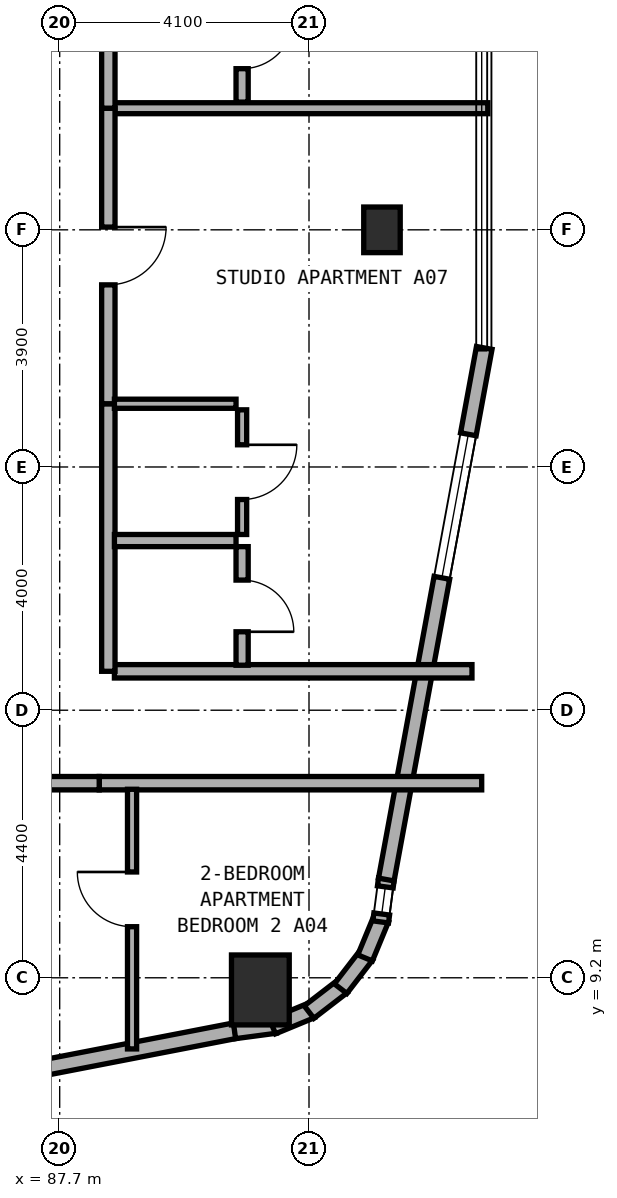
"""IFC4 building model, lengths in metres.
Left out: names, types, materials, properties, quantities, classifications, styles, units other than length and angle.
Written with IfcOpenShell. Run it as: python <this file> out.ifc"""

import sys

from ifc_helpers import new_model, si_unit, direction, frame, frame_2d, origin, origin_2d, place, context, subcontext, project, spatial, rectangle, extrude, element, fill, save


model = new_model("IFC4")
c1 = context("Model", 3, precision=1e-05, world=origin(), true_north=direction((0.0, 1.0)))
c2 = subcontext(c1, "Body", "Model", "MODEL_VIEW")
j1 = project(units=[si_unit("LENGTHUNIT", "METRE"), si_unit("PLANEANGLEUNIT", "RADIAN")], contexts=[c1])
p1 = place(None, origin())
s1 = spatial("IfcSite", under=j1, at=p1, CompositionType="ELEMENT")
p2 = place(p1, origin())
s2 = spatial("IfcBuilding", under=s1, at=p2, CompositionType="ELEMENT")
p3 = place(p2, frame((0.0, 0.0, 95.0)))
s3 = spatial("IfcBuildingStorey", under=s2, at=p3, CompositionType="ELEMENT", Elevation=95.0)
p4 = place(p3, frame((93.0, 21.5, 0.0), z_axis=(0.0, 0.0, 1.0), x_axis=(1.0, 0.0, 0.0)))
e1 = element("IfcColumn", 1, at=p4, inside=s3, PredefinedType="COLUMN", context=c2, shape_type="SweptSolid", body=[
    extrude(rectangle(XDim=0.6, YDim=0.75, at=origin_2d()), origin(), (0.0, 0.0, 1.0), 3.5),
])
p5 = place(p3, frame((91.0, 9.0, 0.0), z_axis=(0.0, 0.0, 1.0), x_axis=(1.0, 0.0, 0.0)))
e2 = element("IfcColumn", 2, at=p5, inside=s3, PredefinedType="COLUMN", context=c2, shape_type="SweptSolid", body=[
    extrude(rectangle(XDim=0.95, YDim=1.15, at=origin_2d()), origin(), (0.0, 0.0, 1.0), 3.5),
])
p6 = place(p3, frame((82.261, 6.718, 0.0), z_axis=(0.0, 0.0, 1.0), x_axis=(0.981750199588, 0.190175039396, 0.0)))
e3 = element("IfcWall", 3, at=p6, inside=s3, PredefinedType="STANDARD", context=c2, shape_type="SweptSolid", body=[
    extrude(rectangle(XDim=8.477, YDim=0.26, at=frame_2d((4.238, 0.0))), origin(), (0.0, 0.0, 1.0), 3.25),
])
p7 = place(p6, frame((2.139, 0.0, 0.8)))
e4 = element("IfcOpeningElement", 4, at=p7, cuts=e3, PredefinedType="OPENING", context=c2, shape_type="SweptSolid", body=[
    extrude(rectangle(XDim=2.4, YDim=1.6, at=frame_2d((1.2, 0.8))), frame((0.0, 0.14, 0.0), z_axis=(0.0, -1.0, 0.0), x_axis=(1.0, 0.0, 0.0)), (0.0, 0.0, 1.0), 0.28),
])
p8 = place(p3, frame((90.575, 8.328, 0.0), z_axis=(0.0, 0.0, 1.0), x_axis=(0.991300187529, 0.13162043232, 0.0)))
e5 = element("IfcWall", 5, at=p8, inside=s3, PredefinedType="STANDARD", context=c2, shape_type="SweptSolid", body=[
    extrude(rectangle(XDim=0.677, YDim=0.26, at=frame_2d((0.338, 0.0))), origin(), (0.0, 0.0, 1.0), 3.25),
])
for number, where, z_axis, x_axis in (
    (6, (91.2, 8.399, 0.0), (0.0, 0.0, 1.0), (0.924, 0.382, 0.0)),
    (7, (91.801, 8.636, 0.0), (0.0, 0.0, 1.0), (0.793, 0.61, 0.0)),
    (8, (92.32, 9.021, 0.0), (0.0, 0.0, 1.0), (0.609, 0.793, 0.0)),
):
    element("IfcWall", number, at=place(p3, frame(where, z_axis=z_axis, x_axis=x_axis)), inside=s3, PredefinedType="STANDARD", context=c2, shape_type="SweptSolid", body=[
        extrude(rectangle(XDim=0.694, YDim=0.26, at=frame_2d((0.347, 0.0))), origin(), (0.0, 0.0, 1.0), 3.25),
    ])
p9 = place(p3, frame((92.722, 9.527, 0.0), z_axis=(0.0, 0.0, 1.0), x_axis=(0.382289608286, 0.924042561464, 0.0)))
e9 = element("IfcWall", 9, at=p9, inside=s3, PredefinedType="STANDARD", context=c2, shape_type="SweptSolid", body=[
    extrude(rectangle(XDim=0.694, YDim=0.26, at=frame_2d((0.347, 0.0))), origin(), (0.0, 0.0, 1.0), 3.25),
])
p10 = place(p3, frame((92.979, 10.119, 0.0), z_axis=(0.0, 0.0, 1.0), x_axis=(0.130614135366, 0.991433279471, 0.0)))
e10 = element("IfcWall", 10, at=p10, inside=s3, PredefinedType="STANDARD", context=c2, shape_type="SweptSolid", body=[
    extrude(rectangle(XDim=0.712, YDim=0.26, at=frame_2d((0.356, 0.0))), origin(), (0.0, 0.0, 1.0), 3.25),
])
p11 = place(p10, frame((0.131, 0.0, 0.85)))
e11 = element("IfcOpeningElement", 11, at=p11, cuts=e10, PredefinedType="OPENING", context=c2, shape_type="SweptSolid", body=[
    extrude(rectangle(XDim=0.45, YDim=1.5, at=frame_2d((0.225, 0.75))), frame((0.0, 0.14, 0.0), z_axis=(0.0, -1.0, 0.0), x_axis=(1.0, 0.0, 0.0)), (0.0, 0.0, 1.0), 0.28),
])
p12 = place(p3, frame((93.071, 10.816, 0.0), z_axis=(0.0, 0.0, 1.0), x_axis=(0.181209963057, 0.983444431215, 0.0)))
e12 = element("IfcWall", 12, at=p12, inside=s3, PredefinedType="STANDARD", context=c2, shape_type="SweptSolid", body=[
    extrude(rectangle(XDim=8.889, YDim=0.26, at=frame_2d((4.445, 0.0))), origin(), (0.0, 0.0, 1.0), 3.25),
])
p13 = place(p12, frame((5.045, 0.0, 0.8)))
e13 = element("IfcOpeningElement", 13, at=p13, cuts=e12, PredefinedType="OPENING", context=c2, shape_type="SweptSolid", body=[
    extrude(rectangle(XDim=2.4, YDim=1.6, at=frame_2d((1.2, 0.8))), frame((0.0, 0.14, 0.0), z_axis=(0.0, -1.0, 0.0), x_axis=(1.0, 0.0, 0.0)), (0.0, 0.0, 1.0), 0.28),
])
p14 = place(p3, frame((88.35, 12.4, 0.0), z_axis=(0.0, 0.0, 1.0), x_axis=(1.0, 0.0, 0.0)))
e14 = element("IfcWall", 14, at=p14, inside=s3, PredefinedType="SOLIDWALL", context=c2, shape_type="SweptSolid", body=[
    extrude(rectangle(XDim=6.29, YDim=0.22, at=frame_2d((3.145, 0.0))), origin(), (0.0, 0.0, 1.0), 2.945),
])
p15 = place(p3, frame((79.28, 12.4, 0.0), z_axis=(0.0, 0.0, 1.0), x_axis=(1.0, 0.0, 0.0)))
e15 = element("IfcWall", 15, at=p15, inside=s3, PredefinedType="SOLIDWALL", context=c2, shape_type="SweptSolid", body=[
    extrude(rectangle(XDim=9.07, YDim=0.22, at=frame_2d((4.535, 0.0))), origin(), (0.0, 0.0, 1.0), 2.825),
])
p16 = place(p15, frame((4.06, 0.0, 0.0)))
e16 = element("IfcOpeningElement", 16, at=p16, cuts=e15, PredefinedType="OPENING", context=c2, shape_type="SweptSolid", body=[
    extrude(rectangle(XDim=0.95, YDim=2.1, at=frame_2d((0.475, 1.05))), frame((0.0, 0.12, 0.0), z_axis=(0.0, -1.0, 0.0), x_axis=(1.0, 0.0, 0.0)), (0.0, 0.0, 1.0), 0.24),
])
p17 = place(p3, frame((88.89, 8.03, 0.0), z_axis=(0.0, 0.0, 1.0), x_axis=(0.0, 1.0, 0.0)))
e17 = element("IfcWall", 17, at=p17, inside=s3, PredefinedType="PARTITIONING", context=c2, shape_type="SweptSolid", body=[
    extrude(rectangle(XDim=4.27, YDim=0.15, at=frame_2d((2.135, 0.0))), origin(), (0.0, 0.0, 1.0), 2.945),
])
p18 = place(p17, frame((2.01, 0.0, 0.0)))
e18 = element("IfcOpeningElement", 18, at=p18, cuts=e17, PredefinedType="OPENING", context=c2, shape_type="SweptSolid", body=[
    extrude(rectangle(XDim=0.9, YDim=2.1, at=frame_2d((0.45, 1.05))), frame((0.0, 0.085, 0.0), z_axis=(0.0, -1.0, 0.0), x_axis=(1.0, 0.0, 0.0)), (0.0, 0.0, 1.0), 0.17),
])
p19 = place(p3, frame((88.6, 14.24, 0.0), z_axis=(0.0, 0.0, 1.0), x_axis=(1.0, 0.0, 0.0)))
e19 = element("IfcWall", 19, at=p19, inside=s3, PredefinedType="SOLIDWALL", context=c2, shape_type="SweptSolid", body=[
    extrude(rectangle(XDim=5.88, YDim=0.22, at=frame_2d((2.94, 0.0))), origin(), (0.0, 0.0, 1.0), 2.945),
])
p20 = place(p3, frame((88.5, 23.5, 0.0), z_axis=(0.0, 0.0, 1.0), x_axis=(1.0, 0.0, 0.0)))
e20 = element("IfcWall", 20, at=p20, inside=s3, PredefinedType="SOLIDWALL", context=c2, shape_type="SweptSolid", body=[
    extrude(rectangle(XDim=6.24, YDim=0.18, at=frame_2d((3.12, 0.0))), origin(), (0.0, 0.0, 1.0), 2.945),
])
p21 = place(p3, frame((88.5, 14.24, 0.0), z_axis=(0.0, 0.0, 1.0), x_axis=(0.0, 1.0, 0.0)))
e21 = element("IfcWall", 21, at=p21, inside=s3, PredefinedType="SOLIDWALL", context=c2, shape_type="SweptSolid", body=[
    extrude(rectangle(XDim=4.4, YDim=0.22, at=frame_2d((2.2, 0.0))), origin(), (0.0, 0.0, 1.0), 3.22),
])
p22 = place(p3, frame((88.5, 18.64, 0.0), z_axis=(0.0, 0.0, 1.0), x_axis=(0.0, 1.0, 0.0)))
e22 = element("IfcWall", 22, at=p22, inside=s3, PredefinedType="SOLIDWALL", context=c2, shape_type="SweptSolid", body=[
    extrude(rectangle(XDim=4.86, YDim=0.22, at=frame_2d((2.43, 0.0))), origin(), (0.0, 0.0, 1.0), 2.825),
])
p23 = place(p22, frame((1.955, 0.0, 0.0)))
e23 = element("IfcOpeningElement", 23, at=p23, cuts=e22, PredefinedType="OPENING", context=c2, shape_type="SweptSolid", body=[
    extrude(rectangle(XDim=0.95, YDim=2.1, at=frame_2d((0.475, 1.05))), frame((0.0, 0.12, 0.0), z_axis=(0.0, -1.0, 0.0), x_axis=(1.0, 0.0, 0.0)), (0.0, 0.0, 1.0), 0.24),
])
p24 = place(p3, frame((88.6, 16.39, 0.0), z_axis=(0.0, 0.0, 1.0), x_axis=(1.0, 0.0, 0.0)))
e24 = element("IfcWall", 24, at=p24, inside=s3, PredefinedType="PLUMBINGWALL", context=c2, shape_type="SweptSolid", body=[
    extrude(rectangle(XDim=2.0, YDim=0.2, at=frame_2d((1.0, 0.0))), origin(), (0.0, 0.0, 1.0), 3.22),
])
p25 = place(p3, frame((88.6, 18.64, 0.0), z_axis=(0.0, 0.0, 1.0), x_axis=(1.0, 0.0, 0.0)))
e25 = element("IfcWall", 25, at=p25, inside=s3, PredefinedType="PARTITIONING", context=c2, shape_type="SweptSolid", body=[
    extrude(rectangle(XDim=2.0, YDim=0.15, at=frame_2d((1.0, 0.0))), origin(), (0.0, 0.0, 1.0), 3.22),
])
p26 = place(p3, frame((90.7, 14.34, 0.0), z_axis=(0.0, 0.0, 1.0), x_axis=(0.0, 1.0, 0.0)))
e26 = element("IfcWall", 26, at=p26, inside=s3, PredefinedType="PLUMBINGWALL", context=c2, shape_type="SweptSolid", body=[
    extrude(rectangle(XDim=1.95, YDim=0.2, at=frame_2d((0.975, 0.0))), origin(), (0.0, 0.0, 1.0), 3.22),
])
p27 = place(p26, frame((0.55, 0.0, 0.0)))
e27 = element("IfcOpeningElement", 27, at=p27, cuts=e26, PredefinedType="OPENING", context=c2, shape_type="SweptSolid", body=[
    extrude(rectangle(XDim=0.85, YDim=2.1, at=frame_2d((0.425, 1.05))), frame((0.0, 0.11, 0.0), z_axis=(0.0, -1.0, 0.0), x_axis=(1.0, 0.0, 0.0)), (0.0, 0.0, 1.0), 0.22),
])
p28 = place(p3, frame((90.7, 16.49, 0.0), z_axis=(0.0, 0.0, 1.0), x_axis=(0.0, 1.0, 0.0)))
e28 = element("IfcWall", 28, at=p28, inside=s3, PredefinedType="PARTITIONING", context=c2, shape_type="SweptSolid", body=[
    extrude(rectangle(XDim=2.05, YDim=0.15, at=frame_2d((1.025, 0.0))), origin(), (0.0, 0.0, 1.0), 3.22),
])
p29 = place(p28, frame((0.575, 0.0, 0.0)))
e29 = element("IfcOpeningElement", 29, at=p29, cuts=e28, PredefinedType="OPENING", context=c2, shape_type="SweptSolid", body=[
    extrude(rectangle(XDim=0.9, YDim=2.1, at=frame_2d((0.45, 1.05))), frame((0.0, 0.085, 0.0), z_axis=(0.0, -1.0, 0.0), x_axis=(1.0, 0.0, 0.0)), (0.0, 0.0, 1.0), 0.17),
])
p30 = place(p3, frame((88.5, 23.5, 0.0), z_axis=(0.0, 0.0, 1.0), x_axis=(0.0, 1.0, 0.0)))
e30 = element("IfcWall", 30, at=p30, inside=s3, PredefinedType="SOLIDWALL", context=c2, shape_type="SweptSolid", body=[
    extrude(rectangle(XDim=4.4, YDim=0.22, at=frame_2d((2.2, 0.0))), origin(), (0.0, 0.0, 1.0), 3.22),
])
p31 = place(p3, frame((90.7, 23.6, 0.0), z_axis=(0.0, 0.0, 1.0), x_axis=(0.0, 1.0, 0.0)))
e31 = element("IfcWall", 31, at=p31, inside=s3, PredefinedType="PLUMBINGWALL", context=c2, shape_type="SweptSolid", body=[
    extrude(rectangle(XDim=1.95, YDim=0.2, at=frame_2d((0.975, 0.0))), origin(), (0.0, 0.0, 1.0), 3.22),
])
p32 = place(p31, frame((0.55, 0.0, 0.0)))
e32 = element("IfcOpeningElement", 32, at=p32, cuts=e31, PredefinedType="OPENING", context=c2, shape_type="SweptSolid", body=[
    extrude(rectangle(XDim=0.85, YDim=2.1, at=frame_2d((0.425, 1.05))), frame((0.0, 0.11, 0.0), z_axis=(0.0, -1.0, 0.0), x_axis=(1.0, 0.0, 0.0)), (0.0, 0.0, 1.0), 0.22),
])
p33 = place(p13, origin())
e33 = element("IfcWindow", 33, at=p33, inside=s3, PartitioningType="SINGLE_PANEL", PredefinedType="WINDOW", context=c2, shape_type="SweptSolid", body=[
    extrude(rectangle(XDim=2.4, YDim=1.6, at=frame_2d((1.2, 0.8))), frame((0.0, 0.03, 0.0), z_axis=(0.0, -1.0, 0.0), x_axis=(1.0, 0.0, 0.0)), (0.0, 0.0, 1.0), 0.06),
])
fill(e13, e33)
p34 = place(p11, origin())
e34 = element("IfcWindow", 34, at=p34, inside=s3, PartitioningType="SINGLE_PANEL", PredefinedType="WINDOW", context=c2, shape_type="SweptSolid", body=[
    extrude(rectangle(XDim=0.45, YDim=1.5, at=frame_2d((0.225, 0.75))), frame((0.0, 0.03, 0.0), z_axis=(0.0, -1.0, 0.0), x_axis=(1.0, 0.0, 0.0)), (0.0, 0.0, 1.0), 0.06),
])
fill(e11, e34)
p35 = place(p18, origin())
e35 = element("IfcDoor", 35, at=p35, inside=s3, OperationType="SINGLE_SWING_RIGHT", PredefinedType="DOOR", context=c2, shape_type="SweptSolid", body=[
    extrude(rectangle(XDim=0.9, YDim=2.1, at=frame_2d((0.45, 1.05))), frame((0.0, 0.025, 0.0), z_axis=(0.0, -1.0, 0.0), x_axis=(1.0, 0.0, 0.0)), (0.0, 0.0, 1.0), 0.05),
])
fill(e18, e35)
p36 = place(p23, frame((0.95, 0.0, 0.0), z_axis=(0.0, 0.0, 1.0), x_axis=(-1.0, 0.0, 0.0)))
e36 = element("IfcDoor", 36, at=p36, inside=s3, OperationType="SINGLE_SWING_LEFT", PredefinedType="DOOR", context=c2, shape_type="SweptSolid", body=[
    extrude(rectangle(XDim=0.95, YDim=2.1, at=frame_2d((0.475, 1.05))), frame((0.0, 0.025, 0.0), z_axis=(0.0, -1.0, 0.0), x_axis=(1.0, 0.0, 0.0)), (0.0, 0.0, 1.0), 0.05),
])
fill(e23, e36)
p37 = place(p27, frame((0.85, 0.0, 0.0), z_axis=(0.0, 0.0, 1.0), x_axis=(-1.0, 0.0, 0.0)))
e37 = element("IfcDoor", 37, at=p37, inside=s3, OperationType="SINGLE_SWING_RIGHT", PredefinedType="DOOR", context=c2, shape_type="SweptSolid", body=[
    extrude(rectangle(XDim=0.85, YDim=2.1, at=frame_2d((0.425, 1.05))), frame((0.0, 0.025, 0.0), z_axis=(0.0, -1.0, 0.0), x_axis=(1.0, 0.0, 0.0)), (0.0, 0.0, 1.0), 0.05),
])
fill(e27, e37)
p38 = place(p29, frame((0.9, 0.0, 0.0), z_axis=(0.0, 0.0, 1.0), x_axis=(-1.0, 0.0, 0.0)))
e38 = element("IfcDoor", 38, at=p38, inside=s3, OperationType="SINGLE_SWING_LEFT", PredefinedType="DOOR", context=c2, shape_type="SweptSolid", body=[
    extrude(rectangle(XDim=0.9, YDim=2.1, at=frame_2d((0.45, 1.05))), frame((0.0, 0.025, 0.0), z_axis=(0.0, -1.0, 0.0), x_axis=(1.0, 0.0, 0.0)), (0.0, 0.0, 1.0), 0.05),
])
fill(e29, e38)
p39 = place(p32, frame((0.85, 0.0, 0.0), z_axis=(0.0, 0.0, 1.0), x_axis=(-1.0, 0.0, 0.0)))
e39 = element("IfcDoor", 39, at=p39, inside=s3, OperationType="SINGLE_SWING_LEFT", PredefinedType="DOOR", context=c2, shape_type="SweptSolid", body=[
    extrude(rectangle(XDim=0.85, YDim=2.1, at=frame_2d((0.425, 1.05))), frame((0.0, 0.025, 0.0), z_axis=(0.0, -1.0, 0.0), x_axis=(1.0, 0.0, 0.0)), (0.0, 0.0, 1.0), 0.05),
])
fill(e32, e39)
save(model, sys.argv[1])
